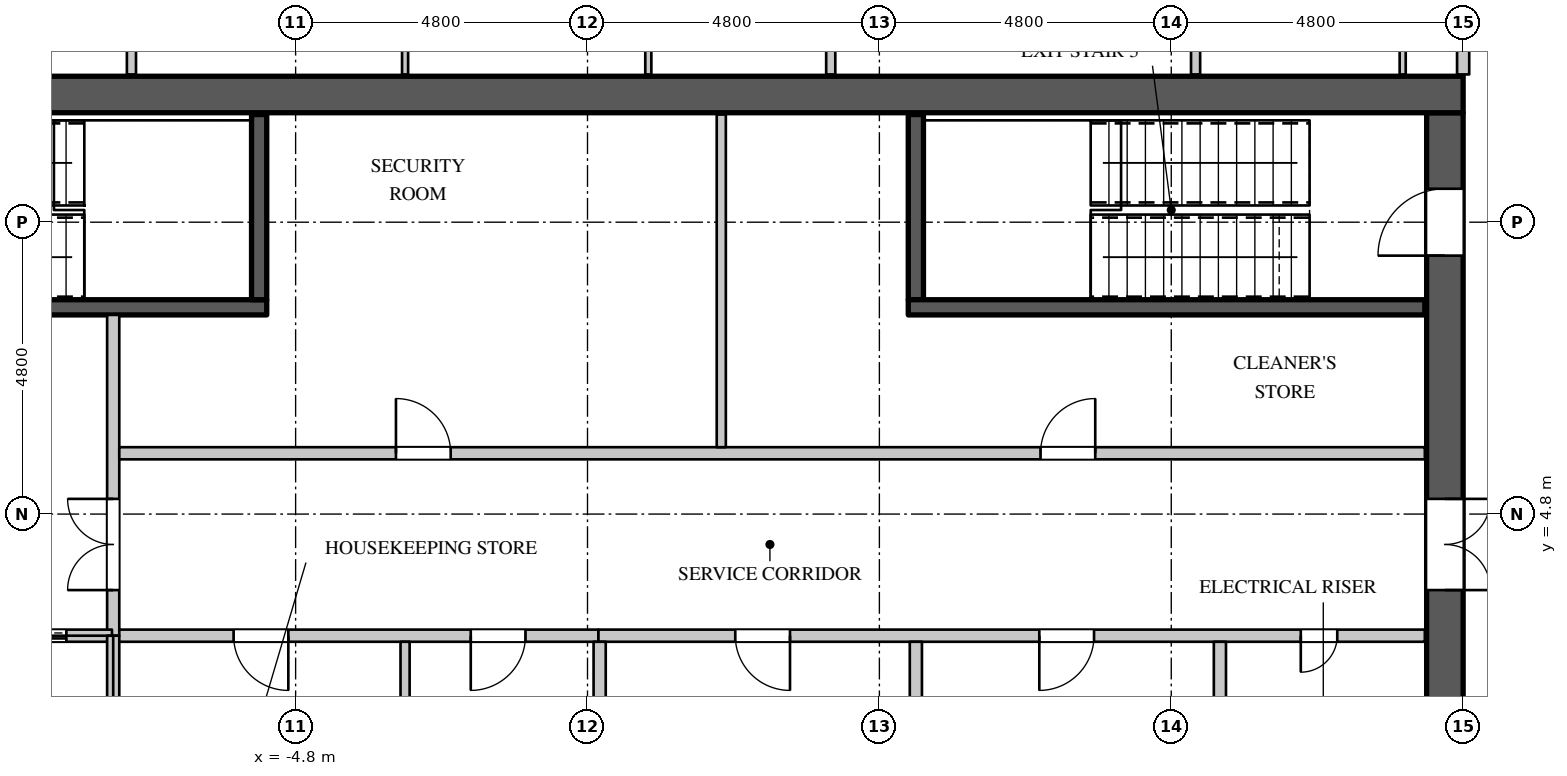
"""IFC4 building model, lengths in metres.
Left out: names, types, materials, properties, quantities, classifications, styles, units other than length and angle.
Written with IfcOpenShell. Run it as: python <this file> out.ifc"""

import sys

from ifc_helpers import new_model, si_unit, direction, frame, frame_2d, origin, place, context, subcontext, project, spatial, rectangle, extrude, element, fill, save


model = new_model("IFC4")
c1 = context("Model", 3, precision=1e-05, world=origin(), true_north=direction((0.0, 1.0)))
c2 = subcontext(c1, "Body", "Model", "MODEL_VIEW")
j1 = project(units=[si_unit("LENGTHUNIT", "METRE"), si_unit("PLANEANGLEUNIT", "RADIAN")], contexts=[c1])
p1 = place(None, origin())
s1 = spatial("IfcSite", under=j1, at=p1, CompositionType="ELEMENT")
p2 = place(p1, origin())
s2 = spatial("IfcBuilding", under=s1, at=p2, CompositionType="ELEMENT")
p3 = place(p2, frame((0.0, 0.0, 260.1)))
s3 = spatial("IfcBuildingStorey", under=s2, at=p3, CompositionType="ELEMENT", Elevation=260.1)
p4 = place(p3, frame((-14.4, 11.7, 0.0), z_axis=(0.0, 0.0, 1.0), x_axis=(1.0, 0.0, 0.0)))
e1 = element("IfcWall", 1, at=p4, inside=s3, PredefinedType="SHEAR", context=c2, shape_type="SweptSolid", body=[
    extrude(rectangle(XDim=28.8, YDim=0.6, at=frame_2d((14.4, 0.0))), origin(), (0.0, 0.0, 1.0), 4.2),
])
p5 = place(p3, frame((14.1, -11.4, 0.0), z_axis=(0.0, 0.0, 1.0), x_axis=(0.0, 1.0, 0.0)))
e2 = element("IfcWall", 2, at=p5, inside=s3, PredefinedType="SHEAR", context=c2, shape_type="SweptSolid", body=[
    extrude(rectangle(XDim=22.8, YDim=0.6, at=frame_2d((11.4, 0.0))), origin(), (0.0, 0.0, 1.0), 4.2),
])
p6 = place(p5, frame((20.45, 0.0, 0.0)))
e3 = element("IfcOpeningElement", 3, at=p6, cuts=e2, PredefinedType="OPENING", context=c2, shape_type="SweptSolid", body=[
    extrude(rectangle(XDim=1.1, YDim=2.2, at=frame_2d((0.55, 1.1))), frame((0.0, 0.31, 0.0), z_axis=(0.0, -1.0, 0.0), x_axis=(1.0, 0.0, 0.0)), (0.0, 0.0, 1.0), 0.62),
])
p7 = place(p5, frame((1.25, 0.0, 0.0)))
e4 = element("IfcOpeningElement", 4, at=p7, cuts=e2, PredefinedType="OPENING", context=c2, shape_type="SweptSolid", body=[
    extrude(rectangle(XDim=1.1, YDim=2.2, at=frame_2d((0.55, 1.1))), frame((0.0, 0.31, 0.0), z_axis=(0.0, -1.0, 0.0), x_axis=(1.0, 0.0, 0.0)), (0.0, 0.0, 1.0), 0.62),
])
p8 = place(p5, frame((14.95, 0.0, 0.0)))
e5 = element("IfcOpeningElement", 5, at=p8, cuts=e2, PredefinedType="OPENING", context=c2, shape_type="SweptSolid", body=[
    extrude(rectangle(XDim=1.5, YDim=2.4, at=frame_2d((0.75, 1.2))), frame((0.0, 0.31, 0.0), z_axis=(0.0, -1.0, 0.0), x_axis=(1.0, 0.0, 0.0)), (0.0, 0.0, 1.0), 0.62),
])
p9 = place(p5, frame((6.35, 0.0, 0.0)))
e6 = element("IfcOpeningElement", 6, at=p9, cuts=e2, PredefinedType="OPENING", context=c2, shape_type="SweptSolid", body=[
    extrude(rectangle(XDim=1.5, YDim=2.4, at=frame_2d((0.75, 1.2))), frame((0.0, 0.31, 0.0), z_axis=(0.0, -1.0, 0.0), x_axis=(1.0, 0.0, 0.0)), (0.0, 0.0, 1.0), 0.62),
])
p10 = place(p3, frame((-7.82, 2.8, 0.0), z_axis=(0.0, 0.0, 1.0), x_axis=(1.0, 0.0, 0.0)))
e7 = element("IfcWall", 7, at=p10, inside=s3, PredefinedType="PARTITIONING", context=c2, shape_type="SweptSolid", body=[
    extrude(rectangle(XDim=8.0, YDim=0.2, at=frame_2d((4.0, 0.0))), origin(), (0.0, 0.0, 1.0), 3.95),
])
p11 = place(p10, frame((2.0, 0.0, 0.0)))
e8 = element("IfcOpeningElement", 8, at=p11, cuts=e7, PredefinedType="OPENING", context=c2, shape_type="SweptSolid", body=[
    extrude(rectangle(XDim=0.9, YDim=2.2, at=frame_2d((0.45, 1.1))), frame((0.0, 0.11, 0.0), z_axis=(0.0, -1.0, 0.0), x_axis=(1.0, 0.0, 0.0)), (0.0, 0.0, 1.0), 0.22),
])
p12 = place(p10, frame((5.9, 0.0, 0.0)))
e9 = element("IfcOpeningElement", 9, at=p12, cuts=e7, PredefinedType="OPENING", context=c2, shape_type="SweptSolid", body=[
    extrude(rectangle(XDim=0.9, YDim=2.2, at=frame_2d((0.45, 1.1))), frame((0.0, 0.11, 0.0), z_axis=(0.0, -1.0, 0.0), x_axis=(1.0, 0.0, 0.0)), (0.0, 0.0, 1.0), 0.22),
])
p13 = place(p3, frame((-7.8, 2.8, 0.0), z_axis=(0.0, 0.0, 1.0), x_axis=(0.0, 1.0, 0.0)))
e10 = element("IfcWall", 10, at=p13, inside=s3, PredefinedType="PARTITIONING", context=c2, shape_type="SweptSolid", body=[
    extrude(rectangle(XDim=5.275, YDim=0.2, at=frame_2d((2.637, 0.0))), origin(), (0.0, 0.0, 1.0), 3.95),
])
p14 = place(p13, frame((0.75, 0.0, 0.0)))
e11 = element("IfcOpeningElement", 11, at=p14, cuts=e10, PredefinedType="OPENING", context=c2, shape_type="SweptSolid", body=[
    extrude(rectangle(XDim=1.5, YDim=2.4, at=frame_2d((0.75, 1.2))), frame((0.0, 0.11, 0.0), z_axis=(0.0, -1.0, 0.0), x_axis=(1.0, 0.0, 0.0)), (0.0, 0.0, 1.0), 0.22),
])
p15 = place(p3, frame((-7.7, 5.8, 0.0), z_axis=(0.0, 0.0, 1.0), x_axis=(1.0, 0.0, 0.0)))
e12 = element("IfcWall", 12, at=p15, inside=s3, PredefinedType="PARTITIONING", context=c2, shape_type="SweptSolid", body=[
    extrude(rectangle(XDim=21.47, YDim=0.2, at=frame_2d((10.735, 0.0))), origin(), (0.0, 0.0, 1.0), 3.95),
])
p16 = place(p15, frame((4.55, 0.0, 0.0)))
e13 = element("IfcOpeningElement", 13, at=p16, cuts=e12, PredefinedType="OPENING", context=c2, shape_type="SweptSolid", body=[
    extrude(rectangle(XDim=0.9, YDim=2.2, at=frame_2d((0.45, 1.1))), frame((0.0, 0.11, 0.0), z_axis=(0.0, -1.0, 0.0), x_axis=(1.0, 0.0, 0.0)), (0.0, 0.0, 1.0), 0.22),
])
p17 = place(p15, frame((15.15, 0.0, 0.0)))
e14 = element("IfcOpeningElement", 14, at=p17, cuts=e12, PredefinedType="OPENING", context=c2, shape_type="SweptSolid", body=[
    extrude(rectangle(XDim=0.9, YDim=2.2, at=frame_2d((0.45, 1.1))), frame((0.0, 0.11, 0.0), z_axis=(0.0, -1.0, 0.0), x_axis=(1.0, 0.0, 0.0)), (0.0, 0.0, 1.0), 0.22),
])
p18 = place(p3, frame((14.4, 12.03, 0.0), z_axis=(0.0, 0.0, 1.0), x_axis=(0.0, 1.0, 0.0)))
e15 = element("IfcWall", 15, at=p18, inside=s3, PredefinedType="PARTITIONING", context=c2, shape_type="SweptSolid", body=[
    extrude(rectangle(XDim=2.27, YDim=0.2, at=frame_2d((1.135, 0.0))), origin(), (0.0, 0.0, 1.0), 3.95),
])
p19 = place(p3, frame((-7.5, 12.03, 0.0), z_axis=(0.0, 0.0, 1.0), x_axis=(0.0, 1.0, 0.0)))
e16 = element("IfcWall", 16, at=p19, inside=s3, PredefinedType="PARTITIONING", context=c2, shape_type="SweptSolid", body=[
    extrude(rectangle(XDim=6.445, YDim=0.15, at=frame_2d((3.223, 0.0))), origin(), (0.0, 0.0, 1.0), 3.95),
])
p20 = place(p19, frame((2.75, 0.0, 0.0)))
e17 = element("IfcOpeningElement", 17, at=p20, cuts=e16, PredefinedType="OPENING", context=c2, shape_type="SweptSolid", body=[
    extrude(rectangle(XDim=0.9, YDim=2.2, at=frame_2d((0.45, 1.1))), frame((0.0, 0.085, 0.0), z_axis=(0.0, -1.0, 0.0), x_axis=(1.0, 0.0, 0.0)), (0.0, 0.0, 1.0), 0.17),
])
p21 = place(p3, frame((-3.0, 0.1, 0.0), z_axis=(0.0, 0.0, 1.0), x_axis=(0.0, 1.0, 0.0)))
e18 = element("IfcWall", 18, at=p21, inside=s3, PredefinedType="PARTITIONING", context=c2, shape_type="SweptSolid", body=[
    extrude(rectangle(XDim=2.6, YDim=0.15, at=frame_2d((1.3, 0.0))), origin(), (0.0, 0.0, 1.0), 3.95),
])
p22 = place(p3, frame((2.2, 5.9, 0.0), z_axis=(0.0, 0.0, 1.0), x_axis=(0.0, 1.0, 0.0)))
e19 = element("IfcWall", 19, at=p22, inside=s3, PredefinedType="PARTITIONING", context=c2, shape_type="SweptSolid", body=[
    extrude(rectangle(XDim=5.47, YDim=0.15, at=frame_2d((2.735, 0.0))), origin(), (0.0, 0.0, 1.0), 3.95),
])
p23 = place(p3, frame((4.0, 12.03, 0.0), z_axis=(0.0, 0.0, 1.0), x_axis=(0.0, 1.0, 0.0)))
e20 = element("IfcWall", 20, at=p23, inside=s3, PredefinedType="PARTITIONING", context=c2, shape_type="SweptSolid", body=[
    extrude(rectangle(XDim=7.395, YDim=0.15, at=frame_2d((3.698, 0.0))), origin(), (0.0, 0.0, 1.0), 3.95),
])
p24 = place(p23, frame((3.25, 0.0, 0.0)))
e21 = element("IfcOpeningElement", 21, at=p24, cuts=e20, PredefinedType="OPENING", context=c2, shape_type="SweptSolid", body=[
    extrude(rectangle(XDim=0.9, YDim=2.2, at=frame_2d((0.45, 1.1))), frame((0.0, 0.085, 0.0), z_axis=(0.0, -1.0, 0.0), x_axis=(1.0, 0.0, 0.0)), (0.0, 0.0, 1.0), 0.17),
])
p25 = place(p3, frame((10.0, 12.03, 0.0), z_axis=(0.0, 0.0, 1.0), x_axis=(0.0, 1.0, 0.0)))
e22 = element("IfcWall", 22, at=p25, inside=s3, PredefinedType="PARTITIONING", context=c2, shape_type="SweptSolid", body=[
    extrude(rectangle(XDim=7.395, YDim=0.15, at=frame_2d((3.698, 0.0))), origin(), (0.0, 0.0, 1.0), 3.95),
])
p26 = place(p3, frame((0.18, 2.8, 0.0), z_axis=(0.0, 0.0, 1.0), x_axis=(1.0, 0.0, 0.0)))
e23 = element("IfcWall", 23, at=p26, inside=s3, PredefinedType="PARTITIONING", context=c2, shape_type="SweptSolid", body=[
    extrude(rectangle(XDim=13.59, YDim=0.2, at=frame_2d((6.795, 0.0))), origin(), (0.0, 0.0, 1.0), 3.95),
])
p27 = place(p26, frame((11.55, 0.0, 0.0)))
e24 = element("IfcOpeningElement", 24, at=p27, cuts=e23, PredefinedType="OPENING", context=c2, shape_type="SweptSolid", body=[
    extrude(rectangle(XDim=0.6, YDim=2.0, at=frame_2d((0.3, 1.0))), frame((0.0, 0.11, 0.0), z_axis=(0.0, -1.0, 0.0), x_axis=(1.0, 0.0, 0.0)), (0.0, 0.0, 1.0), 0.22),
])
p28 = place(p26, frame((2.25, 0.0, 0.0)))
e25 = element("IfcOpeningElement", 25, at=p28, cuts=e23, PredefinedType="OPENING", context=c2, shape_type="SweptSolid", body=[
    extrude(rectangle(XDim=0.9, YDim=2.2, at=frame_2d((0.45, 1.1))), frame((0.0, 0.11, 0.0), z_axis=(0.0, -1.0, 0.0), x_axis=(1.0, 0.0, 0.0)), (0.0, 0.0, 1.0), 0.22),
])
p29 = place(p26, frame((7.25, 0.0, 0.0)))
e26 = element("IfcOpeningElement", 26, at=p29, cuts=e23, PredefinedType="OPENING", context=c2, shape_type="SweptSolid", body=[
    extrude(rectangle(XDim=0.9, YDim=2.2, at=frame_2d((0.45, 1.1))), frame((0.0, 0.11, 0.0), z_axis=(0.0, -1.0, 0.0), x_axis=(1.0, 0.0, 0.0)), (0.0, 0.0, 1.0), 0.22),
])
for number, where, z_axis, x_axis in (
    (27, (0.2, 0.1, 0.0), (0.0, 0.0, 1.0), (0.0, 1.0, 0.0)),
    (28, (5.4, 0.1, 0.0), (0.0, 0.0, 1.0), (0.0, 1.0, 0.0)),
    (29, (10.4, 0.1, 0.0), (0.0, 0.0, 1.0), (0.0, 1.0, 0.0)),
):
    element("IfcWall", number, at=place(p3, frame(where, z_axis=z_axis, x_axis=x_axis)), inside=s3, PredefinedType="PARTITIONING", context=c2, shape_type="SweptSolid", body=[
        extrude(rectangle(XDim=2.6, YDim=0.2, at=frame_2d((1.3, 0.0))), origin(), (0.0, 0.0, 1.0), 3.95),
    ])
p30 = place(p3, frame((-13.77, 2.8, 0.0), z_axis=(0.0, 0.0, 1.0), x_axis=(1.0, 0.0, 0.0)))
e30 = element("IfcWall", 30, at=p30, inside=s3, PredefinedType="PARTITIONING", context=c2, shape_type="SweptSolid", body=[
    extrude(rectangle(XDim=5.95, YDim=0.2, at=frame_2d((2.975, 0.0))), origin(), (0.0, 0.0, 1.0), 3.95),
])
p31 = place(p30, frame((1.1, 0.0, 0.0)))
e31 = element("IfcOpeningElement", 31, at=p31, cuts=e30, PredefinedType="OPENING", context=c2, shape_type="SweptSolid", body=[
    extrude(rectangle(XDim=1.1, YDim=2.2, at=frame_2d((0.55, 1.1))), frame((0.0, 0.11, 0.0), z_axis=(0.0, -1.0, 0.0), x_axis=(1.0, 0.0, 0.0)), (0.0, 0.0, 1.0), 0.22),
])
p32 = place(p30, frame((4.1, 0.0, 0.0)))
e32 = element("IfcOpeningElement", 32, at=p32, cuts=e30, PredefinedType="OPENING", context=c2, shape_type="SweptSolid", body=[
    extrude(rectangle(XDim=1.1, YDim=2.2, at=frame_2d((0.55, 1.1))), frame((0.0, 0.11, 0.0), z_axis=(0.0, -1.0, 0.0), x_axis=(1.0, 0.0, 0.0)), (0.0, 0.0, 1.0), 0.22),
])
p33 = place(p3, frame((-7.8, 0.0, 0.0), z_axis=(0.0, 0.0, 1.0), x_axis=(0.0, 1.0, 0.0)))
e33 = element("IfcWall", 33, at=p33, inside=s3, PredefinedType="PARTITIONING", context=c2, shape_type="SweptSolid", body=[
    extrude(rectangle(XDim=2.8, YDim=0.2, at=frame_2d((1.4, 0.0))), origin(), (0.0, 0.0, 1.0), 3.95),
])
p34 = place(p3, frame((-13.77, 8.2, 0.0), z_axis=(0.0, 0.0, 1.0), x_axis=(1.0, 0.0, 0.0)))
e34 = element("IfcWall", 34, at=p34, inside=s3, PredefinedType="SHEAR", context=c2, shape_type="SweptSolid", body=[
    extrude(rectangle(XDim=8.495, YDim=0.25, at=frame_2d((4.248, 0.0))), origin(), (0.0, 0.0, 1.0), 3.95),
])
p35 = place(p34, frame((0.15, 0.0, 0.0)))
e35 = element("IfcOpeningElement", 35, at=p35, cuts=e34, PredefinedType="OPENING", context=c2, shape_type="SweptSolid", body=[
    extrude(rectangle(XDim=1.1, YDim=2.2, at=frame_2d((0.55, 1.1))), frame((0.0, 0.135, 0.0), z_axis=(0.0, -1.0, 0.0), x_axis=(1.0, 0.0, 0.0)), (0.0, 0.0, 1.0), 0.27),
])
for number, where, z_axis, x_axis in (
    (36, (-5.4, 8.325, 0.0), (0.0, 0.0, 1.0), (0.0, 1.0, 0.0)),
    (37, (5.4, 8.325, 0.0), (0.0, 0.0, 1.0), (0.0, 1.0, 0.0)),
):
    element("IfcWall", number, at=place(p3, frame(where, z_axis=z_axis, x_axis=x_axis)), inside=s3, PredefinedType="SHEAR", context=c2, shape_type="SweptSolid", body=[
        extrude(rectangle(XDim=3.045, YDim=0.25, at=frame_2d((1.522, 0.0))), origin(), (0.0, 0.0, 1.0), 3.95),
    ])
p36 = place(p3, frame((5.275, 8.2, 0.0), z_axis=(0.0, 0.0, 1.0), x_axis=(1.0, 0.0, 0.0)))
e38 = element("IfcWall", 38, at=p36, inside=s3, PredefinedType="SHEAR", context=c2, shape_type="SweptSolid", body=[
    extrude(rectangle(XDim=8.495, YDim=0.25, at=frame_2d((4.248, 0.0))), origin(), (0.0, 0.0, 1.0), 3.95),
])
p37 = place(p3, frame((-3.0, 12.03, 0.0), z_axis=(0.0, 0.0, 1.0), x_axis=(0.0, 1.0, 0.0)))
e39 = element("IfcWall", 39, at=p37, inside=s3, PredefinedType="PARTITIONING", context=c2, shape_type="SweptSolid", body=[
    extrude(rectangle(XDim=7.395, YDim=0.1, at=frame_2d((3.698, 0.0))), origin(), (0.0, 0.0, 1.0), 3.95),
])
p38 = place(p3, frame((1.0, 12.03, 0.0), z_axis=(0.0, 0.0, 1.0), x_axis=(0.0, 1.0, 0.0)))
e40 = element("IfcWall", 40, at=p38, inside=s3, PredefinedType="PARTITIONING", context=c2, shape_type="SweptSolid", body=[
    extrude(rectangle(XDim=7.42, YDim=0.1, at=frame_2d((3.71, 0.0))), origin(), (0.0, 0.0, 1.0), 3.95),
])
p39 = place(p3, frame((13.406, 12.03, 0.0), z_axis=(0.0, 0.0, 1.0), x_axis=(0.0, 1.0, 0.0)))
e41 = element("IfcWall", 41, at=p39, inside=s3, PredefinedType="PARTITIONING", context=c2, shape_type="SweptSolid", body=[
    extrude(rectangle(XDim=4.57, YDim=0.1, at=frame_2d((2.285, 0.0))), origin(), (0.0, 0.0, 1.0), 3.3),
])
p40 = place(p27, origin())
e42 = element("IfcDoor", 42, at=p40, inside=s3, OperationType="SINGLE_SWING_RIGHT", PredefinedType="DOOR", context=c2, shape_type="SweptSolid", body=[
    extrude(rectangle(XDim=0.6, YDim=2.0, at=frame_2d((0.3, 1.0))), frame((0.0, 0.025, 0.0), z_axis=(0.0, -1.0, 0.0), x_axis=(1.0, 0.0, 0.0)), (0.0, 0.0, 1.0), 0.05),
])
fill(e24, e42)
p41 = place(p16, origin())
e43 = element("IfcDoor", 43, at=p41, inside=s3, OperationType="SINGLE_SWING_LEFT", PredefinedType="DOOR", context=c2, shape_type="SweptSolid", body=[
    extrude(rectangle(XDim=0.9, YDim=2.2, at=frame_2d((0.45, 1.1))), frame((0.0, 0.025, 0.0), z_axis=(0.0, -1.0, 0.0), x_axis=(1.0, 0.0, 0.0)), (0.0, 0.0, 1.0), 0.05),
])
fill(e13, e43)
p42 = place(p17, origin())
e44 = element("IfcDoor", 44, at=p42, inside=s3, OperationType="SINGLE_SWING_RIGHT", PredefinedType="DOOR", context=c2, shape_type="SweptSolid", body=[
    extrude(rectangle(XDim=0.9, YDim=2.2, at=frame_2d((0.45, 1.1))), frame((0.0, 0.025, 0.0), z_axis=(0.0, -1.0, 0.0), x_axis=(1.0, 0.0, 0.0)), (0.0, 0.0, 1.0), 0.05),
])
fill(e14, e44)
p43 = place(p11, origin())
e45 = element("IfcDoor", 45, at=p43, inside=s3, OperationType="SINGLE_SWING_LEFT", PredefinedType="DOOR", context=c2, shape_type="SweptSolid", body=[
    extrude(rectangle(XDim=0.9, YDim=2.2, at=frame_2d((0.45, 1.1))), frame((0.0, 0.025, 0.0), z_axis=(0.0, -1.0, 0.0), x_axis=(1.0, 0.0, 0.0)), (0.0, 0.0, 1.0), 0.05),
])
fill(e8, e45)
p44 = place(p12, origin())
e46 = element("IfcDoor", 46, at=p44, inside=s3, OperationType="SINGLE_SWING_RIGHT", PredefinedType="DOOR", context=c2, shape_type="SweptSolid", body=[
    extrude(rectangle(XDim=0.9, YDim=2.2, at=frame_2d((0.45, 1.1))), frame((0.0, 0.025, 0.0), z_axis=(0.0, -1.0, 0.0), x_axis=(1.0, 0.0, 0.0)), (0.0, 0.0, 1.0), 0.05),
])
fill(e9, e46)
p45 = place(p28, origin())
e47 = element("IfcDoor", 47, at=p45, inside=s3, OperationType="SINGLE_SWING_LEFT", PredefinedType="DOOR", context=c2, shape_type="SweptSolid", body=[
    extrude(rectangle(XDim=0.9, YDim=2.2, at=frame_2d((0.45, 1.1))), frame((0.0, 0.025, 0.0), z_axis=(0.0, -1.0, 0.0), x_axis=(1.0, 0.0, 0.0)), (0.0, 0.0, 1.0), 0.05),
])
fill(e25, e47)
p46 = place(p29, origin())
e48 = element("IfcDoor", 48, at=p46, inside=s3, OperationType="SINGLE_SWING_RIGHT", PredefinedType="DOOR", context=c2, shape_type="SweptSolid", body=[
    extrude(rectangle(XDim=0.9, YDim=2.2, at=frame_2d((0.45, 1.1))), frame((0.0, 0.025, 0.0), z_axis=(0.0, -1.0, 0.0), x_axis=(1.0, 0.0, 0.0)), (0.0, 0.0, 1.0), 0.05),
])
fill(e26, e48)
p47 = place(p32, origin())
e49 = element("IfcDoor", 49, at=p47, inside=s3, OperationType="DOUBLE_DOOR_SLIDING", PredefinedType="DOOR", context=c2, shape_type="SweptSolid", body=[
    extrude(rectangle(XDim=1.1, YDim=2.2, at=frame_2d((0.55, 1.1))), frame((0.0, 0.025, 0.0), z_axis=(0.0, -1.0, 0.0), x_axis=(1.0, 0.0, 0.0)), (0.0, 0.0, 1.0), 0.05),
])
fill(e32, e49)
p48 = place(p14, origin())
e50 = element("IfcDoor", 50, at=p48, inside=s3, OperationType="DOUBLE_DOOR_SINGLE_SWING", PredefinedType="DOOR", context=c2, shape_type="SweptSolid", body=[
    extrude(rectangle(XDim=1.5, YDim=2.4, at=frame_2d((0.75, 1.2))), frame((0.0, 0.025, 0.0), z_axis=(0.0, -1.0, 0.0), x_axis=(1.0, 0.0, 0.0)), (0.0, 0.0, 1.0), 0.05),
])
fill(e11, e50)
p49 = place(p6, origin())
e51 = element("IfcDoor", 51, at=p49, inside=s3, OperationType="SINGLE_SWING_LEFT", PredefinedType="DOOR", context=c2, shape_type="SweptSolid", body=[
    extrude(rectangle(XDim=1.1, YDim=2.2, at=frame_2d((0.55, 1.1))), frame((0.0, 0.295, 0.0), z_axis=(0.0, -1.0, 0.0), x_axis=(1.0, 0.0, 0.0)), (0.0, 0.0, 1.0), 0.05),
])
fill(e3, e51)
p50 = place(p8, origin())
e52 = element("IfcDoor", 52, at=p50, inside=s3, OperationType="DOUBLE_DOOR_SINGLE_SWING", PredefinedType="DOOR", context=c2, shape_type="SweptSolid", body=[
    extrude(rectangle(XDim=1.5, YDim=2.4, at=frame_2d((0.75, 1.2))), frame((0.0, -0.245, 0.0), z_axis=(0.0, -1.0, 0.0), x_axis=(1.0, 0.0, 0.0)), (0.0, 0.0, 1.0), 0.05),
])
fill(e5, e52)
save(model, sys.argv[1])
